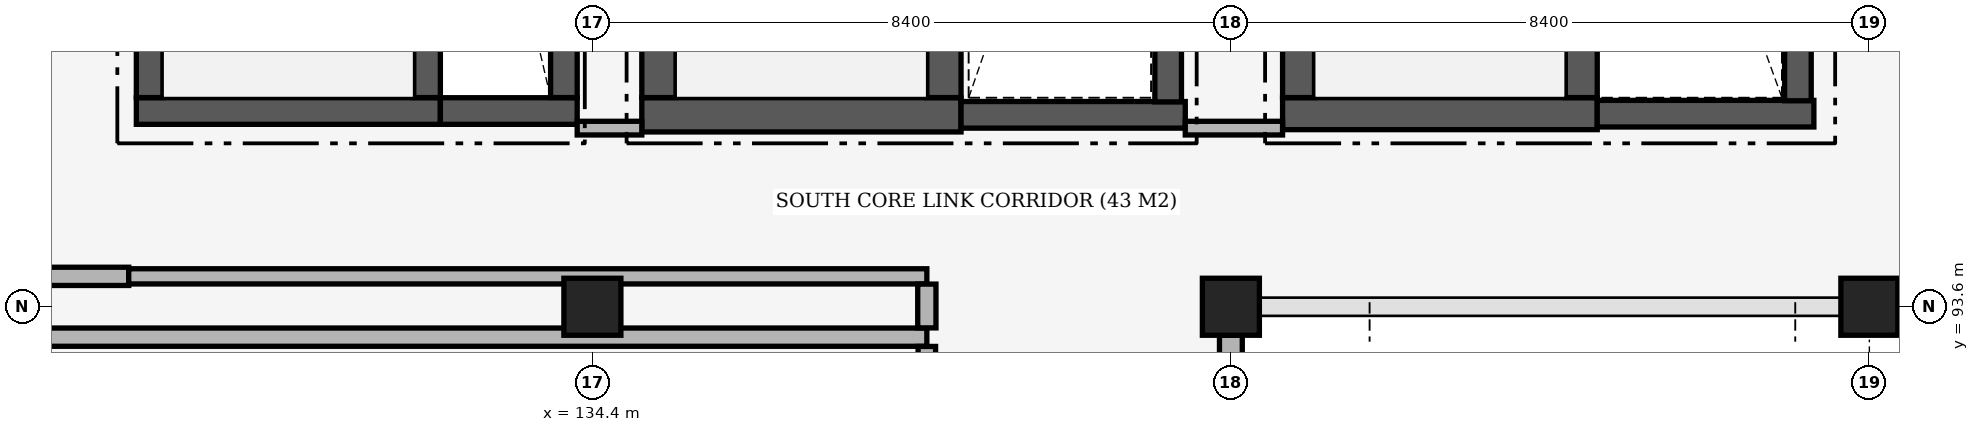
"""IFC4 building model, lengths in metres.
Left out: names, types, materials, properties, quantities, classifications, styles, units other than length and angle.
Written with IfcOpenShell. Run it as: python <this file> out.ifc"""

import sys

from ifc_helpers import new_model, si_unit, direction, frame, frame_2d, origin, origin_2d, place, context, subcontext, project, spatial, rectangle, extrude, element, save


model = new_model("IFC4")
c1 = context("Model", 3, precision=1e-05, world=origin(), true_north=direction((0.0, 1.0)))
c2 = subcontext(c1, "Body", "Model", "MODEL_VIEW")
j1 = project(units=[si_unit("LENGTHUNIT", "METRE"), si_unit("PLANEANGLEUNIT", "RADIAN")], contexts=[c1])
p1 = place(None, origin())
s1 = spatial("IfcSite", under=j1, at=p1, CompositionType="ELEMENT")
p2 = place(p1, origin())
s2 = spatial("IfcBuilding", under=s1, at=p2, CompositionType="ELEMENT")
p3 = place(p2, frame((0.0, 0.0, 10.2)))
s3 = spatial("IfcBuildingStorey", under=s2, at=p3, CompositionType="ELEMENT", Elevation=10.2)
for number, where, z_axis, x_axis in (
    (1, (134.4, 93.6, 0.0), (0.0, 0.0, 1.0), (1.0, 0.0, 0.0)),
    (2, (142.8, 93.6, 0.0), (0.0, 0.0, 1.0), (1.0, 0.0, 0.0)),
    (3, (151.2, 93.6, 0.0), (0.0, 0.0, 1.0), (1.0, 0.0, 0.0)),
):
    element("IfcColumn", number, at=place(p3, frame(where, z_axis=z_axis, x_axis=x_axis)), inside=s3, PredefinedType="COLUMN", context=c2, shape_type="SweptSolid", body=[
        extrude(rectangle(XDim=0.75, YDim=0.75, at=origin_2d()), origin(), (0.0, 0.0, 1.0), 5.1),
    ])
p4 = place(p3, frame((156.225, 93.6, 0.0), z_axis=(0.0, 0.0, 1.0), x_axis=(-1.0, 0.0, 0.0)))
e4 = element("IfcWall", 4, at=p4, inside=s3, PredefinedType="SOLIDWALL", context=c2, shape_type="SweptSolid", body=[
    extrude(rectangle(XDim=4.65, YDim=0.3, at=frame_2d((2.325, 0.0))), origin(), (0.0, 0.0, 1.0), 4.22),
])
p5 = place(p3, frame((142.8, 93.225, 0.0), z_axis=(0.0, 0.0, 1.0), x_axis=(0.0, -1.0, 0.0)))
e5 = element("IfcWall", 5, at=p5, inside=s3, PredefinedType="SOLIDWALL", context=c2, shape_type="SweptSolid", body=[
    extrude(rectangle(XDim=7.65, YDim=0.3, at=frame_2d((3.825, 0.0))), origin(), (0.0, 0.0, 1.0), 4.12),
])
p6 = place(p5, frame((1.483, 0.0, 1.05)))
e6 = element("IfcOpeningElement", 6, at=p6, cuts=e5, PredefinedType="OPENING", context=c2, shape_type="SweptSolid", body=[
    extrude(rectangle(XDim=1.6, YDim=1.8, at=frame_2d((0.8, 0.9))), frame((0.0, 0.165, 0.0), z_axis=(0.0, -1.0, 0.0), x_axis=(1.0, 0.0, 0.0)), (0.0, 0.0, 1.0), 0.33),
])
p7 = place(p5, frame((4.567, 0.0, 1.05)))
e7 = element("IfcOpeningElement", 7, at=p7, cuts=e5, PredefinedType="OPENING", context=c2, shape_type="SweptSolid", body=[
    extrude(rectangle(XDim=1.6, YDim=1.8, at=frame_2d((0.8, 0.9))), frame((0.0, 0.165, 0.0), z_axis=(0.0, -1.0, 0.0), x_axis=(1.0, 0.0, 0.0)), (0.0, 0.0, 1.0), 0.33),
])
p8 = place(p3, frame((128.4, 96.175, 0.0), z_axis=(0.0, 0.0, 1.0), x_axis=(1.0, 0.0, 0.0)))
e8 = element("IfcWall", 8, at=p8, inside=s3, PredefinedType="SHEAR", context=c2, shape_type="SweptSolid", body=[
    extrude(rectangle(XDim=4.0, YDim=0.35, at=frame_2d((2.0, 0.0))), origin(), (0.0, 0.0, 1.0), 4.82),
])
for number, where, z_axis, x_axis in (
    (9, (128.575, 96.352, 0.0), (0.0, 0.0, 1.0), (0.0, 1.0, 0.0)),
    (10, (132.225, 96.352, 0.0), (0.0, 0.0, 1.0), (0.0, 1.0, 0.0)),
):
    element("IfcWall", number, at=place(p3, frame(where, z_axis=z_axis, x_axis=x_axis)), inside=s3, PredefinedType="SHEAR", context=c2, shape_type="SweptSolid", body=[
        extrude(rectangle(XDim=6.896, YDim=0.35, at=frame_2d((3.448, 0.0))), origin(), (0.0, 0.0, 1.0), 4.82),
    ])
p9 = place(p3, frame((132.4, 96.175, 0.0), z_axis=(0.0, 0.0, 1.0), x_axis=(1.0, 0.0, 0.0)))
e11 = element("IfcWall", 11, at=p9, inside=s3, PredefinedType="SHEAR", context=c2, shape_type="SweptSolid", body=[
    extrude(rectangle(XDim=1.8, YDim=0.35, at=frame_2d((0.9, 0.0))), origin(), (0.0, 0.0, 1.0), 4.82),
])
p10 = place(p3, frame((134.025, 96.352, 0.0), z_axis=(0.0, 0.0, 1.0), x_axis=(0.0, 1.0, 0.0)))
e12 = element("IfcWall", 12, at=p10, inside=s3, PredefinedType="SHEAR", context=c2, shape_type="SweptSolid", body=[
    extrude(rectangle(XDim=7.155, YDim=0.35, at=frame_2d((3.578, 0.0))), origin(), (0.0, 0.0, 1.0), 4.82),
])
p11 = place(p3, frame((135.05, 96.125, 0.0), z_axis=(0.0, 0.0, 1.0), x_axis=(1.0, 0.0, 0.0)))
e13 = element("IfcWall", 13, at=p11, inside=s3, PredefinedType="SHEAR", context=c2, shape_type="SweptSolid", body=[
    extrude(rectangle(XDim=4.2, YDim=0.45, at=frame_2d((2.1, 0.0))), origin(), (0.0, 0.0, 1.0), 4.82),
])
for number, where, z_axis, x_axis in (
    (14, (135.275, 96.352, 0.0), (0.0, 0.0, 1.0), (0.0, 1.0, 0.0)),
    (15, (139.025, 96.352, 0.0), (0.0, 0.0, 1.0), (0.0, 1.0, 0.0)),
):
    element("IfcWall", number, at=place(p3, frame(where, z_axis=z_axis, x_axis=x_axis)), inside=s3, PredefinedType="SHEAR", context=c2, shape_type="SweptSolid", body=[
        extrude(rectangle(XDim=6.896, YDim=0.45, at=frame_2d((3.448, 0.0))), origin(), (0.0, 0.0, 1.0), 4.82),
    ])
p12 = place(p3, frame((139.25, 96.125, 0.0), z_axis=(0.0, 0.0, 1.0), x_axis=(1.0, 0.0, 0.0)))
e16 = element("IfcWall", 16, at=p12, inside=s3, PredefinedType="SHEAR", context=c2, shape_type="SweptSolid", body=[
    extrude(rectangle(XDim=2.95, YDim=0.35, at=frame_2d((1.475, 0.0))), origin(), (0.0, 0.0, 1.0), 4.82),
])
p13 = place(p3, frame((141.975, 96.295, 0.0), z_axis=(0.0, 0.0, 1.0), x_axis=(0.0, 1.0, 0.0)))
e17 = element("IfcWall", 17, at=p13, inside=s3, PredefinedType="SHEAR", context=c2, shape_type="SweptSolid", body=[
    extrude(rectangle(XDim=7.212, YDim=0.35, at=frame_2d((3.606, 0.0))), origin(), (0.0, 0.0, 1.0), 4.82),
])
p14 = place(p3, frame((143.48, 96.14, 0.0), z_axis=(0.0, 0.0, 1.0), x_axis=(1.0, 0.0, 0.0)))
e18 = element("IfcWall", 18, at=p14, inside=s3, PredefinedType="SHEAR", context=c2, shape_type="SweptSolid", body=[
    extrude(rectangle(XDim=4.14, YDim=0.42, at=frame_2d((2.07, 0.0))), origin(), (0.0, 0.0, 1.0), 4.82),
])
for number, where, z_axis, x_axis in (
    (19, (143.69, 96.352, 0.0), (0.0, 0.0, 1.0), (0.0, 1.0, 0.0)),
    (20, (147.41, 96.352, 0.0), (0.0, 0.0, 1.0), (0.0, 1.0, 0.0)),
):
    element("IfcWall", number, at=place(p3, frame(where, z_axis=z_axis, x_axis=x_axis)), inside=s3, PredefinedType="SHEAR", context=c2, shape_type="SweptSolid", body=[
        extrude(rectangle(XDim=6.896, YDim=0.42, at=frame_2d((3.448, 0.0))), origin(), (0.0, 0.0, 1.0), 4.82),
    ])
p15 = place(p3, frame((147.62, 96.14, 0.0), z_axis=(0.0, 0.0, 1.0), x_axis=(1.0, 0.0, 0.0)))
e21 = element("IfcWall", 21, at=p15, inside=s3, PredefinedType="SHEAR", context=c2, shape_type="SweptSolid", body=[
    extrude(rectangle(XDim=2.85, YDim=0.35, at=frame_2d((1.425, 0.0))), origin(), (0.0, 0.0, 1.0), 4.82),
])
p16 = place(p3, frame((150.26, 96.31, 0.0), z_axis=(0.0, 0.0, 1.0), x_axis=(0.0, 1.0, 0.0)))
e22 = element("IfcWall", 22, at=p16, inside=s3, PredefinedType="SHEAR", context=c2, shape_type="SweptSolid", body=[
    extrude(rectangle(XDim=7.197, YDim=0.35, at=frame_2d((3.599, 0.0))), origin(), (0.0, 0.0, 1.0), 4.82),
])
p17 = place(p3, frame((126.115, 93.2, 0.0), z_axis=(0.0, 0.0, 1.0), x_axis=(1.0, 0.0, 0.0)))
e23 = element("IfcWall", 23, at=p17, inside=s3, PredefinedType="PARTITIONING", context=c2, shape_type="SweptSolid", body=[
    extrude(rectangle(XDim=12.685, YDim=0.24, at=frame_2d((6.343, 0.0))), origin(), (0.0, 0.0, 1.0), 4.12),
])
p18 = place(p3, frame((126.152, 94.0, 0.0), z_axis=(0.0, 0.0, 1.0), x_axis=(1.0, 0.0, 0.0)))
e24 = element("IfcWall", 24, at=p18, inside=s3, PredefinedType="PARTITIONING", context=c2, shape_type="SweptSolid", body=[
    extrude(rectangle(XDim=2.148, YDim=0.24, at=frame_2d((1.074, 0.0))), origin(), (0.0, 0.0, 1.0), 4.27),
])
p19 = place(p3, frame((128.3, 94.0, 0.0), z_axis=(0.0, 0.0, 1.0), x_axis=(1.0, 0.0, 0.0)))
e25 = element("IfcWall", 25, at=p19, inside=s3, PredefinedType="PARTITIONING", context=c2, shape_type="SweptSolid", body=[
    extrude(rectangle(XDim=10.5, YDim=0.2, at=frame_2d((5.25, 0.0))), origin(), (0.0, 0.0, 1.0), 4.27),
])
p20 = place(p3, frame((134.2, 95.95, 0.0), z_axis=(0.0, 0.0, 1.0), x_axis=(1.0, 0.0, 0.0)))
e26 = element("IfcWall", 26, at=p20, inside=s3, PredefinedType="PARTITIONING", context=c2, shape_type="SweptSolid", body=[
    extrude(rectangle(XDim=0.85, YDim=0.18, at=frame_2d((0.425, 0.0))), origin(), (0.0, 0.0, 1.0), 4.27),
])
p21 = place(p3, frame((142.2, 95.95, 0.0), z_axis=(0.0, 0.0, 1.0), x_axis=(1.0, 0.0, 0.0)))
e27 = element("IfcWall", 27, at=p21, inside=s3, PredefinedType="PARTITIONING", context=c2, shape_type="SweptSolid", body=[
    extrude(rectangle(XDim=1.28, YDim=0.18, at=frame_2d((0.64, 0.0))), origin(), (0.0, 0.0, 1.0), 4.27),
])
p22 = place(p3, frame((138.8, 74.592, 0.0), z_axis=(0.0, 0.0, 1.0), x_axis=(0.0, 1.0, 0.0)))
e28 = element("IfcWall", 28, at=p22, inside=s3, PredefinedType="SOLIDWALL", context=c2, shape_type="SweptSolid", body=[
    extrude(rectangle(XDim=18.486, YDim=0.23, at=frame_2d((9.243, 0.0))), origin(), (0.0, 0.0, 1.0), 4.12),
])
p23 = place(p22, frame((8.768, 0.0, 0.0)))
e29 = element("IfcOpeningElement", 29, at=p23, cuts=e28, PredefinedType="OPENING", context=c2, shape_type="SweptSolid", body=[
    extrude(rectangle(XDim=0.95, YDim=2.1, at=frame_2d((0.475, 1.05))), frame((0.0, 0.13, 0.0), z_axis=(0.0, -1.0, 0.0), x_axis=(1.0, 0.0, 0.0)), (0.0, 0.0, 1.0), 0.26),
])
p24 = place(p3, frame((138.8, 93.322, 0.0), z_axis=(0.0, 0.0, 1.0), x_axis=(0.0, 1.0, 0.0)))
e30 = element("IfcWall", 30, at=p24, inside=s3, PredefinedType="PARTITIONING", context=c2, shape_type="SweptSolid", body=[
    extrude(rectangle(XDim=0.576, YDim=0.24, at=frame_2d((0.288, 0.0))), origin(), (0.0, 0.0, 1.0), 4.12),
])
save(model, sys.argv[1])
